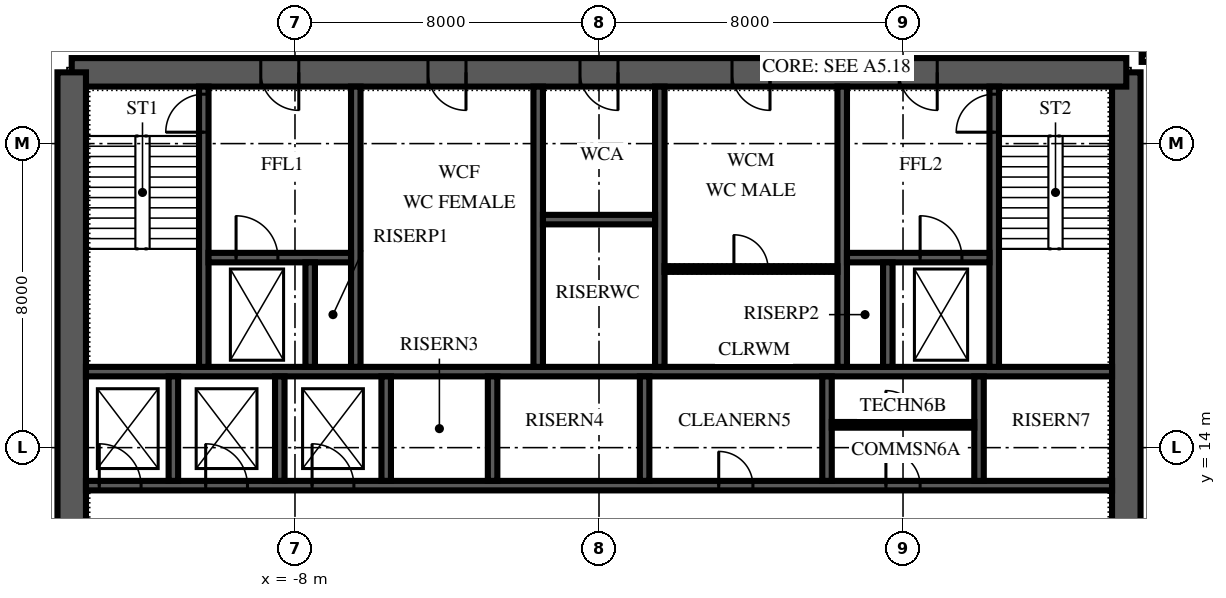
"""IFC4 building model, lengths in metres.
Left out: names, types, materials, properties, quantities, classifications, styles, units other than length and angle.
Written with IfcOpenShell. Run it as: python <this file> out.ifc"""

import sys

from ifc_helpers import new_model, si_unit, direction, frame, frame_2d, origin, place, context, subcontext, project, spatial, polyline, rectangle, outline, extrude, element, fill, save


model = new_model("IFC4")
c1 = context("Model", 3, precision=1e-05, world=origin(), true_north=direction((0.0, 1.0)))
c2 = subcontext(c1, "Body", "Model", "MODEL_VIEW")
j1 = project(units=[si_unit("LENGTHUNIT", "METRE"), si_unit("PLANEANGLEUNIT", "RADIAN")], contexts=[c1])
p1 = place(None, origin())
s1 = spatial("IfcSite", under=j1, at=p1, CompositionType="ELEMENT")
p2 = place(p1, origin())
s2 = spatial("IfcBuilding", under=s1, at=p2, CompositionType="ELEMENT")
p3 = place(p2, frame((0.0, 0.0, 115.0)))
s3 = spatial("IfcBuildingStorey", under=s2, at=p3, CompositionType="ELEMENT", Elevation=115.0)
p4 = place(p3, frame((13.875, 6.125, 0.0), z_axis=(0.0, 0.0, 1.0), x_axis=(0.0, 1.0, 0.0)))
e1 = element("IfcWall", 1, at=p4, inside=s3, PredefinedType="SHEAR", context=c2, shape_type="SweptSolid", body=[
    extrude(outline(polyline([(0.0, -0.375), (17.75, -0.375), (17.75, 0.0), (17.375, 0.0), (17.375, 0.375), (0.375, 0.375), (0.375, 0.0), (0.0, 0.0), (0.0, -0.375)])), origin(), (0.0, 0.0, 1.0), 4.0),
])
p5 = place(p4, frame((4.175, 0.0, 0.0)))
e2 = element("IfcOpeningElement", 2, at=p5, cuts=e1, PredefinedType="OPENING", context=c2, shape_type="SweptSolid", body=[
    extrude(rectangle(XDim=1.8, YDim=2.4, at=frame_2d((0.9, 1.2))), frame((0.0, 0.39, 0.0), z_axis=(0.0, -1.0, 0.0), x_axis=(1.0, 0.0, 0.0)), (0.0, 0.0, 1.0), 0.78),
])
p6 = place(p3, frame((13.875, 23.875, 0.0), z_axis=(0.0, 0.0, 1.0), x_axis=(-1.0, 0.0, 0.0)))
e3 = element("IfcWall", 3, at=p6, inside=s3, PredefinedType="SHEAR", context=c2, shape_type="SweptSolid", body=[
    extrude(rectangle(XDim=27.75, YDim=0.75, at=frame_2d((13.875, 0.0))), origin(), (0.0, 0.0, 1.0), 4.0),
])
p7 = place(p6, frame((21.775, 0.0, 0.0)))
e4 = element("IfcOpeningElement", 4, at=p7, cuts=e3, PredefinedType="OPENING", context=c2, shape_type="SweptSolid", body=[
    extrude(rectangle(XDim=1.0, YDim=2.1, at=frame_2d((0.5, 1.05))), frame((0.0, 0.39, 0.0), z_axis=(0.0, -1.0, 0.0), x_axis=(1.0, 0.0, 0.0)), (0.0, 0.0, 1.0), 0.78),
])
p8 = place(p6, frame((4.975, 0.0, 0.0)))
e5 = element("IfcOpeningElement", 5, at=p8, cuts=e3, PredefinedType="OPENING", context=c2, shape_type="SweptSolid", body=[
    extrude(rectangle(XDim=1.0, YDim=2.1, at=frame_2d((0.5, 1.05))), frame((0.0, 0.39, 0.0), z_axis=(0.0, -1.0, 0.0), x_axis=(1.0, 0.0, 0.0)), (0.0, 0.0, 1.0), 0.78),
])
p9 = place(p6, frame((17.375, 0.0, 0.0)))
e6 = element("IfcOpeningElement", 6, at=p9, cuts=e3, PredefinedType="OPENING", context=c2, shape_type="SweptSolid", body=[
    extrude(rectangle(XDim=1.0, YDim=2.1, at=frame_2d((0.5, 1.05))), frame((0.0, 0.39, 0.0), z_axis=(0.0, -1.0, 0.0), x_axis=(1.0, 0.0, 0.0)), (0.0, 0.0, 1.0), 0.78),
])
p10 = place(p6, frame((13.375, 0.0, 0.0)))
e7 = element("IfcOpeningElement", 7, at=p10, cuts=e3, PredefinedType="OPENING", context=c2, shape_type="SweptSolid", body=[
    extrude(rectangle(XDim=1.0, YDim=2.1, at=frame_2d((0.5, 1.05))), frame((0.0, 0.39, 0.0), z_axis=(0.0, -1.0, 0.0), x_axis=(1.0, 0.0, 0.0)), (0.0, 0.0, 1.0), 0.78),
])
p11 = place(p6, frame((9.375, 0.0, 0.0)))
e8 = element("IfcOpeningElement", 8, at=p11, cuts=e3, PredefinedType="OPENING", context=c2, shape_type="SweptSolid", body=[
    extrude(rectangle(XDim=1.0, YDim=2.1, at=frame_2d((0.5, 1.05))), frame((0.0, 0.39, 0.0), z_axis=(0.0, -1.0, 0.0), x_axis=(1.0, 0.0, 0.0)), (0.0, 0.0, 1.0), 0.78),
])
p12 = place(p3, frame((-13.875, 23.875, 0.0), z_axis=(0.0, 0.0, 1.0), x_axis=(0.0, -1.0, 0.0)))
e9 = element("IfcWall", 9, at=p12, inside=s3, PredefinedType="SHEAR", context=c2, shape_type="SweptSolid", body=[
    extrude(outline(polyline([(0.0, -0.375), (17.75, -0.375), (17.75, 0.0), (17.375, 0.0), (17.375, 0.375), (0.375, 0.375), (0.375, 0.0), (0.0, 0.0), (0.0, -0.375)])), origin(), (0.0, 0.0, 1.0), 4.0),
])
p13 = place(p12, frame((11.775, 0.0, 0.0)))
e10 = element("IfcOpeningElement", 10, at=p13, cuts=e9, PredefinedType="OPENING", context=c2, shape_type="SweptSolid", body=[
    extrude(rectangle(XDim=1.8, YDim=2.4, at=frame_2d((0.9, 1.2))), frame((0.0, 0.39, 0.0), z_axis=(0.0, -1.0, 0.0), x_axis=(1.0, 0.0, 0.0)), (0.0, 0.0, 1.0), 0.78),
])
p14 = place(p3, frame((-13.5, 13.0, 0.0), z_axis=(0.0, 0.0, 1.0), x_axis=(1.0, 0.0, 0.0)))
e11 = element("IfcWall", 11, at=p14, inside=s3, PredefinedType="SHEAR", context=c2, shape_type="SweptSolid", body=[
    extrude(rectangle(XDim=27.0, YDim=0.25, at=frame_2d((13.5, 0.0))), origin(), (0.0, 0.0, 1.0), 4.0),
])
p15 = place(p14, frame((0.35, 0.0, 0.0)))
e12 = element("IfcOpeningElement", 12, at=p15, cuts=e11, PredefinedType="OPENING", context=c2, shape_type="SweptSolid", body=[
    extrude(rectangle(XDim=1.1, YDim=2.1, at=frame_2d((0.55, 1.05))), frame((0.0, 0.14, 0.0), z_axis=(0.0, -1.0, 0.0), x_axis=(1.0, 0.0, 0.0)), (0.0, 0.0, 1.0), 0.28),
])
p16 = place(p14, frame((3.15, 0.0, 0.0)))
e13 = element("IfcOpeningElement", 13, at=p16, cuts=e11, PredefinedType="OPENING", context=c2, shape_type="SweptSolid", body=[
    extrude(rectangle(XDim=1.1, YDim=2.1, at=frame_2d((0.55, 1.05))), frame((0.0, 0.14, 0.0), z_axis=(0.0, -1.0, 0.0), x_axis=(1.0, 0.0, 0.0)), (0.0, 0.0, 1.0), 0.28),
])
p17 = place(p14, frame((5.95, 0.0, 0.0)))
e14 = element("IfcOpeningElement", 14, at=p17, cuts=e11, PredefinedType="OPENING", context=c2, shape_type="SweptSolid", body=[
    extrude(rectangle(XDim=1.1, YDim=2.1, at=frame_2d((0.55, 1.05))), frame((0.0, 0.14, 0.0), z_axis=(0.0, -1.0, 0.0), x_axis=(1.0, 0.0, 0.0)), (0.0, 0.0, 1.0), 0.28),
])
p18 = place(p14, frame((16.65, 0.0, 0.0)))
e15 = element("IfcOpeningElement", 15, at=p18, cuts=e11, PredefinedType="OPENING", context=c2, shape_type="SweptSolid", body=[
    extrude(rectangle(XDim=0.9, YDim=2.1, at=frame_2d((0.45, 1.05))), frame((0.0, 0.14, 0.0), z_axis=(0.0, -1.0, 0.0), x_axis=(1.0, 0.0, 0.0)), (0.0, 0.0, 1.0), 0.28),
])
p19 = place(p14, frame((21.05, 0.0, 0.0)))
e16 = element("IfcOpeningElement", 16, at=p19, cuts=e11, PredefinedType="OPENING", context=c2, shape_type="SweptSolid", body=[
    extrude(rectangle(XDim=0.9, YDim=2.1, at=frame_2d((0.45, 1.05))), frame((0.0, 0.14, 0.0), z_axis=(0.0, -1.0, 0.0), x_axis=(1.0, 0.0, 0.0)), (0.0, 0.0, 1.0), 0.28),
])
p20 = place(p3, frame((-13.5, 16.0, 0.0), z_axis=(0.0, 0.0, 1.0), x_axis=(1.0, 0.0, 0.0)))
e17 = element("IfcWall", 17, at=p20, inside=s3, PredefinedType="SHEAR", context=c2, shape_type="SweptSolid", body=[
    extrude(rectangle(XDim=27.0, YDim=0.25, at=frame_2d((13.5, 0.0))), origin(), (0.0, 0.0, 1.0), 4.0),
])
for number, where, z_axis, x_axis in (
    (18, (-11.2, 13.125, 0.0), (0.0, 0.0, 1.0), (0.0, 1.0, 0.0)),
    (19, (-8.4, 13.125, 0.0), (0.0, 0.0, 1.0), (0.0, 1.0, 0.0)),
    (20, (-5.6, 13.125, 0.0), (0.0, 0.0, 1.0), (0.0, 1.0, 0.0)),
    (21, (-2.8, 13.125, 0.0), (0.0, 0.0, 1.0), (0.0, 1.0, 0.0)),
    (22, (1.2, 13.125, 0.0), (0.0, 0.0, 1.0), (0.0, 1.0, 0.0)),
    (23, (6.0, 13.125, 0.0), (0.0, 0.0, 1.0), (0.0, 1.0, 0.0)),
    (24, (10.0, 13.125, 0.0), (0.0, 0.0, 1.0), (0.0, 1.0, 0.0)),
):
    element("IfcWall", number, at=place(p3, frame(where, z_axis=z_axis, x_axis=x_axis)), inside=s3, PredefinedType="SHEAR", context=c2, shape_type="SweptSolid", body=[
        extrude(rectangle(XDim=2.75, YDim=0.25, at=frame_2d((1.375, 0.0))), origin(), (0.0, 0.0, 1.0), 4.0),
    ])
p21 = place(p3, frame((-10.4, 16.125, 0.0), z_axis=(0.0, 0.0, 1.0), x_axis=(0.0, 1.0, 0.0)))
e25 = element("IfcWall", 25, at=p21, inside=s3, PredefinedType="SHEAR", context=c2, shape_type="SweptSolid", body=[
    extrude(rectangle(XDim=7.375, YDim=0.25, at=frame_2d((3.688, 0.0))), origin(), (0.0, 0.0, 1.0), 4.0),
])
p22 = place(p21, frame((6.175, 0.0, 0.0)))
e26 = element("IfcOpeningElement", 26, at=p22, cuts=e25, PredefinedType="OPENING", context=c2, shape_type="SweptSolid", body=[
    extrude(rectangle(XDim=1.0, YDim=2.1, at=frame_2d((0.5, 1.05))), frame((0.0, 0.14, 0.0), z_axis=(0.0, -1.0, 0.0), x_axis=(1.0, 0.0, 0.0)), (0.0, 0.0, 1.0), 0.28),
])
for number, where, z_axis, x_axis in (
    (27, (-6.4, 16.125, 0.0), (0.0, 0.0, 1.0), (0.0, 1.0, 0.0)),
    (28, (-1.6, 16.125, 0.0), (0.0, 0.0, 1.0), (0.0, 1.0, 0.0)),
    (29, (1.6, 16.125, 0.0), (0.0, 0.0, 1.0), (0.0, 1.0, 0.0)),
    (30, (6.4, 16.125, 0.0), (0.0, 0.0, 1.0), (0.0, 1.0, 0.0)),
):
    element("IfcWall", number, at=place(p3, frame(where, z_axis=z_axis, x_axis=x_axis)), inside=s3, PredefinedType="SHEAR", context=c2, shape_type="SweptSolid", body=[
        extrude(rectangle(XDim=7.375, YDim=0.25, at=frame_2d((3.688, 0.0))), origin(), (0.0, 0.0, 1.0), 4.0),
    ])
p23 = place(p3, frame((10.4, 16.125, 0.0), z_axis=(0.0, 0.0, 1.0), x_axis=(0.0, 1.0, 0.0)))
e31 = element("IfcWall", 31, at=p23, inside=s3, PredefinedType="SHEAR", context=c2, shape_type="SweptSolid", body=[
    extrude(rectangle(XDim=7.375, YDim=0.25, at=frame_2d((3.688, 0.0))), origin(), (0.0, 0.0, 1.0), 4.0),
])
p24 = place(p23, frame((6.175, 0.0, 0.0)))
e32 = element("IfcOpeningElement", 32, at=p24, cuts=e31, PredefinedType="OPENING", context=c2, shape_type="SweptSolid", body=[
    extrude(rectangle(XDim=1.0, YDim=2.1, at=frame_2d((0.5, 1.05))), frame((0.0, 0.14, 0.0), z_axis=(0.0, -1.0, 0.0), x_axis=(1.0, 0.0, 0.0)), (0.0, 0.0, 1.0), 0.28),
])
p25 = place(p3, frame((-10.275, 19.0, 0.0), z_axis=(0.0, 0.0, 1.0), x_axis=(1.0, 0.0, 0.0)))
e33 = element("IfcWall", 33, at=p25, inside=s3, PredefinedType="SHEAR", context=c2, shape_type="SweptSolid", body=[
    extrude(rectangle(XDim=3.75, YDim=0.25, at=frame_2d((1.875, 0.0))), origin(), (0.0, 0.0, 1.0), 4.0),
])
p26 = place(p25, frame((0.725, 0.0, 0.0)))
e34 = element("IfcOpeningElement", 34, at=p26, cuts=e33, PredefinedType="OPENING", context=c2, shape_type="SweptSolid", body=[
    extrude(rectangle(XDim=1.1, YDim=2.1, at=frame_2d((0.55, 1.05))), frame((0.0, 0.14, 0.0), z_axis=(0.0, -1.0, 0.0), x_axis=(1.0, 0.0, 0.0)), (0.0, 0.0, 1.0), 0.28),
])
p27 = place(p3, frame((6.525, 19.0, 0.0), z_axis=(0.0, 0.0, 1.0), x_axis=(1.0, 0.0, 0.0)))
e35 = element("IfcWall", 35, at=p27, inside=s3, PredefinedType="SHEAR", context=c2, shape_type="SweptSolid", body=[
    extrude(rectangle(XDim=3.75, YDim=0.25, at=frame_2d((1.875, 0.0))), origin(), (0.0, 0.0, 1.0), 4.0),
])
p28 = place(p27, frame((1.925, 0.0, 0.0)))
e36 = element("IfcOpeningElement", 36, at=p28, cuts=e35, PredefinedType="OPENING", context=c2, shape_type="SweptSolid", body=[
    extrude(rectangle(XDim=1.1, YDim=2.1, at=frame_2d((0.55, 1.05))), frame((0.0, 0.14, 0.0), z_axis=(0.0, -1.0, 0.0), x_axis=(1.0, 0.0, 0.0)), (0.0, 0.0, 1.0), 0.28),
])
for number, where, z_axis, x_axis in (
    (37, (-7.6, 16.125, 0.0), (0.0, 0.0, 1.0), (0.0, 1.0, 0.0)),
    (38, (7.6, 16.125, 0.0), (0.0, 0.0, 1.0), (0.0, 1.0, 0.0)),
):
    element("IfcWall", number, at=place(p3, frame(where, z_axis=z_axis, x_axis=x_axis)), inside=s3, PredefinedType="SHEAR", context=c2, shape_type="SweptSolid", body=[
        extrude(rectangle(XDim=2.75, YDim=0.25, at=frame_2d((1.375, 0.0))), origin(), (0.0, 0.0, 1.0), 4.0),
    ])
p29 = place(p3, frame((-1.475, 20.0, 0.0), z_axis=(0.0, 0.0, 1.0), x_axis=(1.0, 0.0, 0.0)))
e39 = element("IfcWall", 39, at=p29, inside=s3, PredefinedType="SHEAR", context=c2, shape_type="SweptSolid", body=[
    extrude(rectangle(XDim=2.95, YDim=0.25, at=frame_2d((1.475, 0.0))), origin(), (0.0, 0.0, 1.0), 4.0),
])
p30 = place(p3, frame((1.725, 18.7, 0.0), z_axis=(0.0, 0.0, 1.0), x_axis=(1.0, 0.0, 0.0)))
e40 = element("IfcWall", 40, at=p30, inside=s3, PredefinedType="PARTITIONING", context=c2, shape_type="SweptSolid", body=[
    extrude(rectangle(XDim=4.55, YDim=0.15, at=frame_2d((2.275, 0.0))), origin(), (0.0, 0.0, 1.0), 3.85),
])
p31 = place(p30, frame((1.825, 0.0, 0.0)))
e41 = element("IfcOpeningElement", 41, at=p31, cuts=e40, PredefinedType="OPENING", context=c2, shape_type="SweptSolid", body=[
    extrude(rectangle(XDim=0.9, YDim=2.1, at=frame_2d((0.45, 1.05))), frame((0.0, 0.09, 0.0), z_axis=(0.0, -1.0, 0.0), x_axis=(1.0, 0.0, 0.0)), (0.0, 0.0, 1.0), 0.18),
])
p32 = place(p3, frame((6.125, 14.6, 0.0), z_axis=(0.0, 0.0, 1.0), x_axis=(1.0, 0.0, 0.0)))
e42 = element("IfcWall", 42, at=p32, inside=s3, PredefinedType="PARTITIONING", context=c2, shape_type="SweptSolid", body=[
    extrude(rectangle(XDim=3.75, YDim=0.15, at=frame_2d((1.875, 0.0))), origin(), (0.0, 0.0, 1.0), 3.85),
])
p33 = place(p32, frame((1.425, 0.0, 0.0)))
e43 = element("IfcOpeningElement", 43, at=p33, cuts=e42, PredefinedType="OPENING", context=c2, shape_type="SweptSolid", body=[
    extrude(rectangle(XDim=0.9, YDim=2.1, at=frame_2d((0.45, 1.05))), frame((0.0, 0.09, 0.0), z_axis=(0.0, -1.0, 0.0), x_axis=(1.0, 0.0, 0.0)), (0.0, 0.0, 1.0), 0.18),
])
p34 = place(p3, frame((14.28, 24.25, 0.0), z_axis=(0.0, 0.0, 1.0), x_axis=(1.0, 0.0, 0.0)))
e44 = element("IfcWall", 44, at=p34, inside=s3, PredefinedType="PARTITIONING", context=c2, shape_type="SweptSolid", body=[
    extrude(rectangle(XDim=2.02, YDim=0.2, at=frame_2d((1.01, 0.0))), origin(), (0.0, 0.0, 1.0), 3.4),
])
p35 = place(p7, origin())
e45 = element("IfcDoor", 45, at=p35, inside=s3, OperationType="SINGLE_SWING_RIGHT", PredefinedType="DOOR", context=c2, shape_type="SweptSolid", body=[
    extrude(rectangle(XDim=1.0, YDim=2.1, at=frame_2d((0.5, 1.05))), frame((0.0, 0.375, 0.0), z_axis=(0.0, -1.0, 0.0), x_axis=(1.0, 0.0, 0.0)), (0.0, 0.0, 1.0), 0.75),
])
fill(e4, e45)
p36 = place(p8, origin())
e46 = element("IfcDoor", 46, at=p36, inside=s3, OperationType="SINGLE_SWING_RIGHT", PredefinedType="DOOR", context=c2, shape_type="SweptSolid", body=[
    extrude(rectangle(XDim=1.0, YDim=2.1, at=frame_2d((0.5, 1.05))), frame((0.0, 0.375, 0.0), z_axis=(0.0, -1.0, 0.0), x_axis=(1.0, 0.0, 0.0)), (0.0, 0.0, 1.0), 0.75),
])
fill(e5, e46)
p37 = place(p9, origin())
e47 = element("IfcDoor", 47, at=p37, inside=s3, OperationType="SINGLE_SWING_LEFT", PredefinedType="DOOR", context=c2, shape_type="SweptSolid", body=[
    extrude(rectangle(XDim=1.0, YDim=2.1, at=frame_2d((0.5, 1.05))), frame((0.0, 0.375, 0.0), z_axis=(0.0, -1.0, 0.0), x_axis=(1.0, 0.0, 0.0)), (0.0, 0.0, 1.0), 0.75),
])
fill(e6, e47)
p38 = place(p10, origin())
e48 = element("IfcDoor", 48, at=p38, inside=s3, OperationType="SINGLE_SWING_LEFT", PredefinedType="DOOR", context=c2, shape_type="SweptSolid", body=[
    extrude(rectangle(XDim=1.0, YDim=2.1, at=frame_2d((0.5, 1.05))), frame((0.0, 0.375, 0.0), z_axis=(0.0, -1.0, 0.0), x_axis=(1.0, 0.0, 0.0)), (0.0, 0.0, 1.0), 0.75),
])
fill(e7, e48)
p39 = place(p11, origin())
e49 = element("IfcDoor", 49, at=p39, inside=s3, OperationType="SINGLE_SWING_LEFT", PredefinedType="DOOR", context=c2, shape_type="SweptSolid", body=[
    extrude(rectangle(XDim=1.0, YDim=2.1, at=frame_2d((0.5, 1.05))), frame((0.0, 0.375, 0.0), z_axis=(0.0, -1.0, 0.0), x_axis=(1.0, 0.0, 0.0)), (0.0, 0.0, 1.0), 0.75),
])
fill(e8, e49)
p40 = place(p22, origin())
e50 = element("IfcDoor", 50, at=p40, inside=s3, OperationType="SINGLE_SWING_LEFT", PredefinedType="DOOR", context=c2, shape_type="SweptSolid", body=[
    extrude(rectangle(XDim=1.0, YDim=2.1, at=frame_2d((0.5, 1.05))), frame((0.0, 0.125, 0.0), z_axis=(0.0, -1.0, 0.0), x_axis=(1.0, 0.0, 0.0)), (0.0, 0.0, 1.0), 0.25),
])
fill(e26, e50)
p41 = place(p24, origin())
e51 = element("IfcDoor", 51, at=p41, inside=s3, OperationType="SINGLE_SWING_LEFT", PredefinedType="DOOR", context=c2, shape_type="SweptSolid", body=[
    extrude(rectangle(XDim=1.0, YDim=2.1, at=frame_2d((0.5, 1.05))), frame((0.0, 0.125, 0.0), z_axis=(0.0, -1.0, 0.0), x_axis=(1.0, 0.0, 0.0)), (0.0, 0.0, 1.0), 0.25),
])
fill(e32, e51)
p42 = place(p15, origin())
e52 = element("IfcDoor", 52, at=p42, inside=s3, OperationType="SLIDING_TO_LEFT", PredefinedType="DOOR", context=c2, shape_type="SweptSolid", body=[
    extrude(rectangle(XDim=1.1, YDim=2.1, at=frame_2d((0.55, 1.05))), frame((0.0, 0.125, 0.0), z_axis=(0.0, -1.0, 0.0), x_axis=(1.0, 0.0, 0.0)), (0.0, 0.0, 1.0), 0.25),
])
fill(e12, e52)
p43 = place(p16, origin())
e53 = element("IfcDoor", 53, at=p43, inside=s3, OperationType="SLIDING_TO_LEFT", PredefinedType="DOOR", context=c2, shape_type="SweptSolid", body=[
    extrude(rectangle(XDim=1.1, YDim=2.1, at=frame_2d((0.55, 1.05))), frame((0.0, 0.125, 0.0), z_axis=(0.0, -1.0, 0.0), x_axis=(1.0, 0.0, 0.0)), (0.0, 0.0, 1.0), 0.25),
])
fill(e13, e53)
p44 = place(p17, origin())
e54 = element("IfcDoor", 54, at=p44, inside=s3, OperationType="SLIDING_TO_LEFT", PredefinedType="DOOR", context=c2, shape_type="SweptSolid", body=[
    extrude(rectangle(XDim=1.1, YDim=2.1, at=frame_2d((0.55, 1.05))), frame((0.0, 0.125, 0.0), z_axis=(0.0, -1.0, 0.0), x_axis=(1.0, 0.0, 0.0)), (0.0, 0.0, 1.0), 0.25),
])
fill(e14, e54)
p45 = place(p28, origin())
e55 = element("IfcDoor", 55, at=p45, inside=s3, OperationType="SLIDING_TO_RIGHT", PredefinedType="DOOR", context=c2, shape_type="SweptSolid", body=[
    extrude(rectangle(XDim=1.1, YDim=2.1, at=frame_2d((0.55, 1.05))), frame((0.0, 0.125, 0.0), z_axis=(0.0, -1.0, 0.0), x_axis=(1.0, 0.0, 0.0)), (0.0, 0.0, 1.0), 0.25),
])
fill(e36, e55)
p46 = place(p26, origin())
e56 = element("IfcDoor", 56, at=p46, inside=s3, OperationType="SLIDING_TO_RIGHT", PredefinedType="DOOR", context=c2, shape_type="SweptSolid", body=[
    extrude(rectangle(XDim=1.1, YDim=2.1, at=frame_2d((0.55, 1.05))), frame((0.0, 0.125, 0.0), z_axis=(0.0, -1.0, 0.0), x_axis=(1.0, 0.0, 0.0)), (0.0, 0.0, 1.0), 0.25),
])
fill(e34, e56)
p47 = place(p18, origin())
e57 = element("IfcDoor", 57, at=p47, inside=s3, OperationType="SINGLE_SWING_LEFT", PredefinedType="DOOR", context=c2, shape_type="SweptSolid", body=[
    extrude(rectangle(XDim=0.9, YDim=2.1, at=frame_2d((0.45, 1.05))), frame((0.0, 0.125, 0.0), z_axis=(0.0, -1.0, 0.0), x_axis=(1.0, 0.0, 0.0)), (0.0, 0.0, 1.0), 0.25),
])
fill(e15, e57)
p48 = place(p19, origin())
e58 = element("IfcDoor", 58, at=p48, inside=s3, OperationType="SINGLE_SWING_LEFT", PredefinedType="DOOR", context=c2, shape_type="SweptSolid", body=[
    extrude(rectangle(XDim=0.9, YDim=2.1, at=frame_2d((0.45, 1.05))), frame((0.0, 0.125, 0.0), z_axis=(0.0, -1.0, 0.0), x_axis=(1.0, 0.0, 0.0)), (0.0, 0.0, 1.0), 0.25),
])
fill(e16, e58)
p49 = place(p33, origin())
e59 = element("IfcDoor", 59, at=p49, inside=s3, OperationType="SINGLE_SWING_LEFT", PredefinedType="DOOR", context=c2, shape_type="SweptSolid", body=[
    extrude(rectangle(XDim=0.9, YDim=2.1, at=frame_2d((0.45, 1.05))), frame((0.0, 0.075, 0.0), z_axis=(0.0, -1.0, 0.0), x_axis=(1.0, 0.0, 0.0)), (0.0, 0.0, 1.0), 0.149),
])
fill(e43, e59)
p50 = place(p31, origin())
e60 = element("IfcDoor", 60, at=p50, inside=s3, OperationType="SINGLE_SWING_LEFT", PredefinedType="DOOR", context=c2, shape_type="SweptSolid", body=[
    extrude(rectangle(XDim=0.9, YDim=2.1, at=frame_2d((0.45, 1.05))), frame((0.0, 0.075, 0.0), z_axis=(0.0, -1.0, 0.0), x_axis=(1.0, 0.0, 0.0)), (0.0, 0.0, 1.0), 0.149),
])
fill(e41, e60)
save(model, sys.argv[1])
